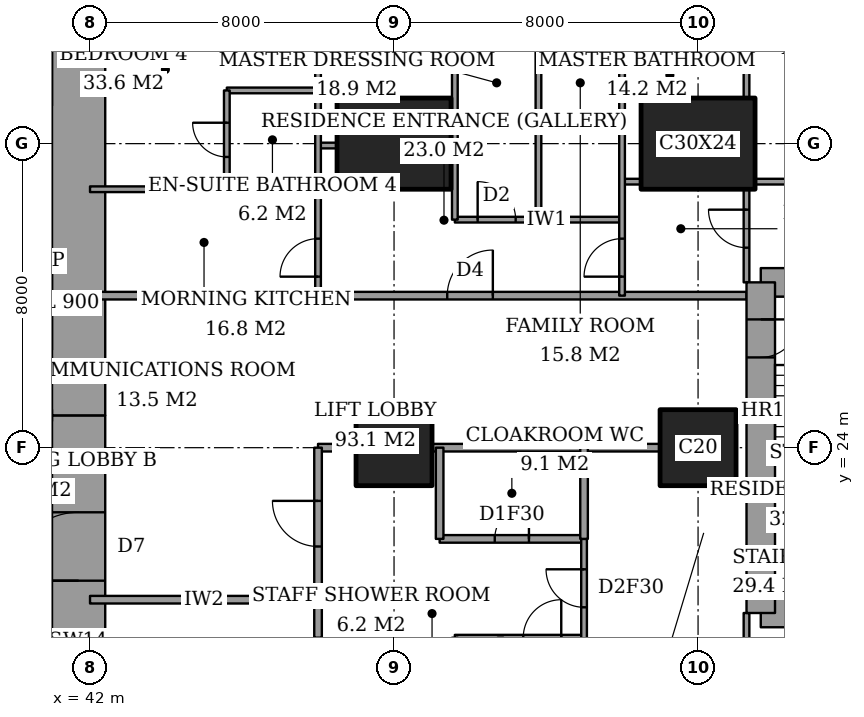
"""IFC4 building model, lengths in metres.
Left out: names, types, materials, properties, quantities, classifications, styles, units other than length and angle.
Written with IfcOpenShell. Run it as: python <this file> out.ifc"""

import sys

from ifc_helpers import new_model, si_unit, direction, frame, frame_2d, origin, origin_2d, place, context, subcontext, project, spatial, rectangle, extrude, element, fill, save


model = new_model("IFC4")
c1 = context("Model", 3, precision=1e-05, world=origin(), true_north=direction((0.0, 1.0)))
c2 = subcontext(c1, "Body", "Model", "MODEL_VIEW")
j1 = project(units=[si_unit("LENGTHUNIT", "METRE"), si_unit("PLANEANGLEUNIT", "RADIAN")], contexts=[c1])
p1 = place(None, origin())
s1 = spatial("IfcSite", under=j1, at=p1, CompositionType="ELEMENT")
p2 = place(p1, origin())
s2 = spatial("IfcBuilding", under=s1, at=p2, CompositionType="ELEMENT")
p3 = place(p2, frame((0.0, 0.0, 143.0)))
s3 = spatial("IfcBuildingStorey", under=s2, at=p3, CompositionType="ELEMENT", Elevation=143.0)
p4 = place(p3, frame((50.0, 24.0, 0.0), z_axis=(0.0, 0.0, 1.0), x_axis=(1.0, 0.0, 0.0)))
e1 = element("IfcColumn", 1, at=p4, inside=s3, PredefinedType="COLUMN", context=c2, shape_type="SweptSolid", body=[
    extrude(rectangle(XDim=2.0, YDim=2.0, at=origin_2d()), origin(), (0.0, 0.0, 1.0), 3.6),
])
p5 = place(p3, frame((50.0, 32.0, 0.0), z_axis=(0.0, 0.0, 1.0), x_axis=(1.0, 0.0, 0.0)))
e2 = element("IfcColumn", 2, at=p5, inside=s3, PredefinedType="COLUMN", context=c2, shape_type="SweptSolid", body=[
    extrude(rectangle(XDim=3.0, YDim=2.4, at=origin_2d()), origin(), (0.0, 0.0, 1.0), 3.6),
])
p6 = place(p3, frame((58.0, 24.0, 0.0), z_axis=(0.0, 0.0, 1.0), x_axis=(1.0, 0.0, 0.0)))
e3 = element("IfcColumn", 3, at=p6, inside=s3, PredefinedType="COLUMN", context=c2, shape_type="SweptSolid", body=[
    extrude(rectangle(XDim=2.0, YDim=2.0, at=origin_2d()), origin(), (0.0, 0.0, 1.0), 3.6),
])
p7 = place(p3, frame((58.0, 32.0, 0.0), z_axis=(0.0, 0.0, 1.0), x_axis=(1.0, 0.0, 0.0)))
e4 = element("IfcColumn", 4, at=p7, inside=s3, PredefinedType="COLUMN", context=c2, shape_type="SweptSolid", body=[
    extrude(rectangle(XDim=3.0, YDim=2.4, at=origin_2d()), origin(), (0.0, 0.0, 1.0), 3.6),
])
p8 = place(p3, frame((41.7, 13.0, 0.0), z_axis=(0.0, 0.0, 1.0), x_axis=(0.0, 1.0, 0.0)))
e5 = element("IfcWall", 5, at=p8, inside=s3, PredefinedType="SHEAR", context=c2, shape_type="SweptSolid", body=[
    extrude(rectangle(XDim=11.85, YDim=1.4, at=frame_2d((5.925, 0.0))), origin(), (0.0, 0.0, 1.0), 3.6),
])
p9 = place(p8, frame((7.5, 0.0, 0.0)))
e6 = element("IfcOpeningElement", 6, at=p9, cuts=e5, PredefinedType="OPENING", context=c2, shape_type="SweptSolid", body=[
    extrude(rectangle(XDim=1.8, YDim=2.4, at=frame_2d((0.9, 1.2))), frame((0.0, 0.71, 0.0), z_axis=(0.0, -1.0, 0.0), x_axis=(1.0, 0.0, 0.0)), (0.0, 0.0, 1.0), 1.42),
])
p10 = place(p3, frame((41.7, 24.85, 0.0), z_axis=(0.0, 0.0, 1.0), x_axis=(0.0, 1.0, 0.0)))
e7 = element("IfcWall", 7, at=p10, inside=s3, PredefinedType="SHEAR", context=c2, shape_type="SweptSolid", body=[
    extrude(rectangle(XDim=10.15, YDim=1.4, at=frame_2d((5.075, 0.0))), origin(), (0.0, 0.0, 1.0), 3.6),
])
for number, where, z_axis, x_axis in (
    (8, (59.65, 19.65, 0.0), (0.0, 0.0, 1.0), (1.0, 0.0, 0.0)),
    (9, (64.1, 28.35, 0.0), (0.0, 0.0, 1.0), (-1.0, 0.0, 0.0)),
):
    element("IfcWall", number, at=place(p3, frame(where, z_axis=z_axis, x_axis=x_axis)), inside=s3, PredefinedType="SHEAR", context=c2, shape_type="SweptSolid", body=[
        extrude(rectangle(XDim=4.45, YDim=0.75, at=frame_2d((2.225, 0.0))), origin(), (0.0, 0.0, 1.0), 3.6),
    ])
p11 = place(p3, frame((59.65, 28.35, 0.0), z_axis=(0.0, 0.0, 1.0), x_axis=(0.0, -1.0, 0.0)))
e10 = element("IfcWall", 10, at=p11, inside=s3, PredefinedType="SHEAR", context=c2, shape_type="SweptSolid", body=[
    extrude(rectangle(XDim=8.7, YDim=0.75, at=frame_2d((4.35, 0.0))), origin(), (0.0, 0.0, 1.0), 3.6),
])
p12 = place(p11, frame((0.975, 0.0, 0.0)))
e11 = element("IfcOpeningElement", 11, at=p12, cuts=e10, PredefinedType="OPENING", context=c2, shape_type="SweptSolid", body=[
    extrude(rectangle(XDim=1.0, YDim=2.1, at=frame_2d((0.5, 1.05))), frame((0.0, 0.385, 0.0), z_axis=(0.0, -1.0, 0.0), x_axis=(1.0, 0.0, 0.0)), (0.0, 0.0, 1.0), 0.77),
])
p13 = place(p3, frame((51.6, 19.0, 0.0), z_axis=(0.0, 0.0, 1.0), x_axis=(1.0, 0.0, 0.0)))
e12 = element("IfcWall", 12, at=p13, inside=s3, PredefinedType="PARTITIONING", context=c2, shape_type="SweptSolid", body=[
    extrude(rectangle(XDim=3.4, YDim=0.15, at=frame_2d((1.7, 0.0))), origin(), (0.0, 0.0, 1.0), 3.35),
])
p14 = place(p13, frame((1.8, 0.0, 0.0)))
e13 = element("IfcOpeningElement", 13, at=p14, cuts=e12, PredefinedType="OPENING", context=c2, shape_type="SweptSolid", body=[
    extrude(rectangle(XDim=1.0, YDim=2.1, at=frame_2d((0.5, 1.05))), frame((0.0, 0.085, 0.0), z_axis=(0.0, -1.0, 0.0), x_axis=(1.0, 0.0, 0.0)), (0.0, 0.0, 1.0), 0.17),
])
p15 = place(p3, frame((42.0, 20.0, 0.0), z_axis=(0.0, 0.0, 1.0), x_axis=(1.0, 0.0, 0.0)))
e14 = element("IfcWall", 14, at=p15, inside=s3, PredefinedType="PARTITIONING", context=c2, shape_type="SweptSolid", body=[
    extrude(rectangle(XDim=6.0, YDim=0.2, at=frame_2d((3.0, 0.0))), origin(), (0.0, 0.0, 1.0), 3.35),
])
p16 = place(p3, frame((51.2, 21.6, 0.0), z_axis=(0.0, 0.0, 1.0), x_axis=(1.0, 0.0, 0.0)))
e15 = element("IfcWall", 15, at=p16, inside=s3, PredefinedType="PARTITIONING", context=c2, shape_type="SweptSolid", body=[
    extrude(rectangle(XDim=3.8, YDim=0.2, at=frame_2d((1.9, 0.0))), origin(), (0.0, 0.0, 1.0), 3.35),
])
p17 = place(p16, frame((1.45, 0.0, 0.0)))
e16 = element("IfcOpeningElement", 16, at=p17, cuts=e15, PredefinedType="OPENING", context=c2, shape_type="SweptSolid", body=[
    extrude(rectangle(XDim=0.9, YDim=2.1, at=frame_2d((0.45, 1.05))), frame((0.0, 0.11, 0.0), z_axis=(0.0, -1.0, 0.0), x_axis=(1.0, 0.0, 0.0)), (0.0, 0.0, 1.0), 0.22),
])
p18 = place(p3, frame((48.0, 24.0, 0.0), z_axis=(0.0, 0.0, 1.0), x_axis=(1.0, 0.0, 0.0)))
e17 = element("IfcWall", 17, at=p18, inside=s3, PredefinedType="PARTITIONING", context=c2, shape_type="SweptSolid", body=[
    extrude(rectangle(XDim=1.0, YDim=0.2, at=frame_2d((0.5, 0.0))), origin(), (0.0, 0.0, 1.0), 3.35),
])
p19 = place(p3, frame((51.0, 24.0, 0.0), z_axis=(0.0, 0.0, 1.0), x_axis=(1.0, 0.0, 0.0)))
e18 = element("IfcWall", 18, at=p19, inside=s3, PredefinedType="PARTITIONING", context=c2, shape_type="SweptSolid", body=[
    extrude(rectangle(XDim=6.0, YDim=0.2, at=frame_2d((3.0, 0.0))), origin(), (0.0, 0.0, 1.0), 3.35),
])
p20 = place(p3, frame((42.0, 28.0, 0.0), z_axis=(0.0, 0.0, 1.0), x_axis=(1.0, 0.0, 0.0)))
e19 = element("IfcWall", 19, at=p20, inside=s3, PredefinedType="PARTITIONING", context=c2, shape_type="SweptSolid", body=[
    extrude(rectangle(XDim=17.275, YDim=0.2, at=frame_2d((8.637, 0.0))), origin(), (0.0, 0.0, 1.0), 3.35),
])
p21 = place(p20, frame((9.4, 0.0, 0.0)))
e20 = element("IfcOpeningElement", 20, at=p21, cuts=e19, PredefinedType="OPENING", context=c2, shape_type="SweptSolid", body=[
    extrude(rectangle(XDim=1.2, YDim=2.4, at=frame_2d((0.6, 1.2))), frame((0.0, 0.11, 0.0), z_axis=(0.0, -1.0, 0.0), x_axis=(1.0, 0.0, 0.0)), (0.0, 0.0, 1.0), 0.22),
])
p22 = place(p3, frame((51.6, 30.0, 0.0), z_axis=(0.0, 0.0, 1.0), x_axis=(1.0, 0.0, 0.0)))
e21 = element("IfcWall", 21, at=p22, inside=s3, PredefinedType="PARTITIONING", context=c2, shape_type="SweptSolid", body=[
    extrude(rectangle(XDim=4.4, YDim=0.15, at=frame_2d((2.2, 0.0))), origin(), (0.0, 0.0, 1.0), 3.35),
])
p23 = place(p22, frame((0.6, 0.0, 0.0)))
e22 = element("IfcOpeningElement", 22, at=p23, cuts=e21, PredefinedType="OPENING", context=c2, shape_type="SweptSolid", body=[
    extrude(rectangle(XDim=1.0, YDim=2.1, at=frame_2d((0.5, 1.05))), frame((0.0, 0.085, 0.0), z_axis=(0.0, -1.0, 0.0), x_axis=(1.0, 0.0, 0.0)), (0.0, 0.0, 1.0), 0.17),
])
p24 = place(p3, frame((42.0, 30.8, 0.0), z_axis=(0.0, 0.0, 1.0), x_axis=(1.0, 0.0, 0.0)))
e23 = element("IfcWall", 23, at=p24, inside=s3, PredefinedType="PARTITIONING", context=c2, shape_type="SweptSolid", body=[
    extrude(rectangle(XDim=6.0, YDim=0.15, at=frame_2d((3.0, 0.0))), origin(), (0.0, 0.0, 1.0), 3.35),
])
p25 = place(p3, frame((56.0, 31.0, 0.0), z_axis=(0.0, 0.0, 1.0), x_axis=(1.0, 0.0, 0.0)))
e24 = element("IfcWall", 24, at=p25, inside=s3, PredefinedType="PARTITIONING", context=c2, shape_type="SweptSolid", body=[
    extrude(rectangle(XDim=0.5, YDim=0.15, at=frame_2d((0.25, 0.0))), origin(), (0.0, 0.0, 1.0), 3.35),
])
p26 = place(p3, frame((59.5, 31.0, 0.0), z_axis=(0.0, 0.0, 1.0), x_axis=(1.0, 0.0, 0.0)))
e25 = element("IfcWall", 25, at=p26, inside=s3, PredefinedType="PARTITIONING", context=c2, shape_type="SweptSolid", body=[
    extrude(rectangle(XDim=5.15, YDim=0.15, at=frame_2d((2.575, 0.0))), origin(), (0.0, 0.0, 1.0), 3.35),
])
p27 = place(p3, frame((48.0, 31.95, 0.0), z_axis=(0.0, 0.0, 1.0), x_axis=(1.0, 0.0, 0.0)))
e26 = element("IfcWall", 26, at=p27, inside=s3, PredefinedType="PARTITIONING", context=c2, shape_type="SweptSolid", body=[
    extrude(rectangle(XDim=0.5, YDim=0.15, at=frame_2d((0.25, 0.0))), origin(), (0.0, 0.0, 1.0), 2.634),
])
p28 = place(p3, frame((45.6, 33.4, 0.0), z_axis=(0.0, 0.0, 1.0), x_axis=(1.0, 0.0, 0.0)))
e27 = element("IfcWall", 27, at=p28, inside=s3, PredefinedType="PARTITIONING", context=c2, shape_type="SweptSolid", body=[
    extrude(rectangle(XDim=2.4, YDim=0.15, at=frame_2d((1.2, 0.0))), origin(), (0.0, 0.0, 1.0), 3.35),
])
p29 = place(p3, frame((45.6, 30.8, 0.0), z_axis=(0.0, 0.0, 1.0), x_axis=(0.0, 1.0, 0.0)))
e28 = element("IfcWall", 28, at=p29, inside=s3, PredefinedType="PARTITIONING", context=c2, shape_type="SweptSolid", body=[
    extrude(rectangle(XDim=2.6, YDim=0.15, at=frame_2d((1.3, 0.0))), origin(), (0.0, 0.0, 1.0), 3.35),
])
p30 = place(p29, frame((0.85, 0.0, 0.0)))
e29 = element("IfcOpeningElement", 29, at=p30, cuts=e28, PredefinedType="OPENING", context=c2, shape_type="SweptSolid", body=[
    extrude(rectangle(XDim=0.9, YDim=2.1, at=frame_2d((0.45, 1.05))), frame((0.0, 0.085, 0.0), z_axis=(0.0, -1.0, 0.0), x_axis=(1.0, 0.0, 0.0)), (0.0, 0.0, 1.0), 0.17),
])
p31 = place(p3, frame((48.0, 19.0, 0.0), z_axis=(0.0, 0.0, 1.0), x_axis=(0.0, 1.0, 0.0)))
e30 = element("IfcWall", 30, at=p31, inside=s3, PredefinedType="PARTITIONING", context=c2, shape_type="SweptSolid", body=[
    extrude(rectangle(XDim=5.0, YDim=0.2, at=frame_2d((2.5, 0.0))), origin(), (0.0, 0.0, 1.0), 3.35),
])
p32 = place(p31, frame((2.4, 0.0, 0.0)))
e31 = element("IfcOpeningElement", 31, at=p32, cuts=e30, PredefinedType="OPENING", context=c2, shape_type="SweptSolid", body=[
    extrude(rectangle(XDim=1.2, YDim=2.4, at=frame_2d((0.6, 1.2))), frame((0.0, 0.11, 0.0), z_axis=(0.0, -1.0, 0.0), x_axis=(1.0, 0.0, 0.0)), (0.0, 0.0, 1.0), 0.22),
])
p33 = place(p3, frame((48.0, 28.0, 0.0), z_axis=(0.0, 0.0, 1.0), x_axis=(0.0, 1.0, 0.0)))
e32 = element("IfcWall", 32, at=p33, inside=s3, PredefinedType="PARTITIONING", context=c2, shape_type="SweptSolid", body=[
    extrude(rectangle(XDim=9.2, YDim=0.15, at=frame_2d((4.6, 0.0))), origin(), (0.0, 0.0, 1.0), 3.35),
])
p34 = place(p33, frame((0.5, 0.0, 0.0)))
e33 = element("IfcOpeningElement", 33, at=p34, cuts=e32, PredefinedType="OPENING", context=c2, shape_type="SweptSolid", body=[
    extrude(rectangle(XDim=1.0, YDim=2.1, at=frame_2d((0.5, 1.05))), frame((0.0, 0.085, 0.0), z_axis=(0.0, -1.0, 0.0), x_axis=(1.0, 0.0, 0.0)), (0.0, 0.0, 1.0), 0.17),
])
p35 = place(p3, frame((51.2, 21.6, 0.0), z_axis=(0.0, 0.0, 1.0), x_axis=(0.0, 1.0, 0.0)))
e34 = element("IfcWall", 34, at=p35, inside=s3, PredefinedType="PARTITIONING", context=c2, shape_type="SweptSolid", body=[
    extrude(rectangle(XDim=2.4, YDim=0.2, at=frame_2d((1.2, 0.0))), origin(), (0.0, 0.0, 1.0), 3.35),
])
p36 = place(p3, frame((51.6, 16.05, 0.0), z_axis=(0.0, 0.0, 1.0), x_axis=(0.0, 1.0, 0.0)))
e35 = element("IfcWall", 35, at=p36, inside=s3, PredefinedType="PARTITIONING", context=c2, shape_type="SweptSolid", body=[
    extrude(rectangle(XDim=2.95, YDim=0.15, at=frame_2d((1.475, 0.0))), origin(), (0.0, 0.0, 1.0), 3.35),
])
for number, where, z_axis, x_axis in (
    (36, (51.6, 30.0, 0.0), (0.0, 0.0, 1.0), (0.0, 1.0, 0.0)),
    (37, (53.8, 30.0, 0.0), (0.0, 0.0, 1.0), (0.0, 1.0, 0.0)),
):
    element("IfcWall", number, at=place(p3, frame(where, z_axis=z_axis, x_axis=x_axis)), inside=s3, PredefinedType="PARTITIONING", context=c2, shape_type="SweptSolid", body=[
        extrude(rectangle(XDim=7.2, YDim=0.15, at=frame_2d((3.6, 0.0))), origin(), (0.0, 0.0, 1.0), 3.35),
    ])
p37 = place(p3, frame((55.0, 21.6, 0.0), z_axis=(0.0, 0.0, 1.0), x_axis=(0.0, 1.0, 0.0)))
e38 = element("IfcWall", 38, at=p37, inside=s3, PredefinedType="PARTITIONING", context=c2, shape_type="SweptSolid", body=[
    extrude(rectangle(XDim=2.4, YDim=0.2, at=frame_2d((1.2, 0.0))), origin(), (0.0, 0.0, 1.0), 3.35),
])
p38 = place(p3, frame((55.0, 10.6, 0.0), z_axis=(0.0, 0.0, 1.0), x_axis=(0.0, 1.0, 0.0)))
e39 = element("IfcWall", 39, at=p38, inside=s3, PredefinedType="PARTITIONING", context=c2, shape_type="SweptSolid", body=[
    extrude(rectangle(XDim=11.0, YDim=0.15, at=frame_2d((5.5, 0.0))), origin(), (0.0, 0.0, 1.0), 3.35),
])
p39 = place(p38, frame((9.2, 0.0, 0.0)))
e40 = element("IfcOpeningElement", 40, at=p39, cuts=e39, PredefinedType="OPENING", context=c2, shape_type="SweptSolid", body=[
    extrude(rectangle(XDim=1.0, YDim=2.1, at=frame_2d((0.5, 1.05))), frame((0.0, 0.085, 0.0), z_axis=(0.0, -1.0, 0.0), x_axis=(1.0, 0.0, 0.0)), (0.0, 0.0, 1.0), 0.17),
])
p40 = place(p3, frame((56.0, 28.0, 0.0), z_axis=(0.0, 0.0, 1.0), x_axis=(0.0, 1.0, 0.0)))
e41 = element("IfcWall", 41, at=p40, inside=s3, PredefinedType="PARTITIONING", context=c2, shape_type="SweptSolid", body=[
    extrude(rectangle(XDim=9.2, YDim=0.15, at=frame_2d((4.6, 0.0))), origin(), (0.0, 0.0, 1.0), 3.35),
])
p41 = place(p40, frame((0.5, 0.0, 0.0)))
e42 = element("IfcOpeningElement", 42, at=p41, cuts=e41, PredefinedType="OPENING", context=c2, shape_type="SweptSolid", body=[
    extrude(rectangle(XDim=1.0, YDim=2.1, at=frame_2d((0.5, 1.05))), frame((0.0, 0.085, 0.0), z_axis=(0.0, -1.0, 0.0), x_axis=(1.0, 0.0, 0.0)), (0.0, 0.0, 1.0), 0.17),
])
p42 = place(p3, frame((59.275, 17.2, 0.0), z_axis=(0.0, 0.0, 1.0), x_axis=(0.0, 1.0, 0.0)))
e43 = element("IfcWall", 43, at=p42, inside=s3, PredefinedType="PARTITIONING", context=c2, shape_type="SweptSolid", body=[
    extrude(rectangle(XDim=2.45, YDim=0.15, at=frame_2d((1.225, 0.0))), origin(), (0.0, 0.0, 1.0), 3.35),
])
p43 = place(p42, frame((0.538, 0.0, 0.0)))
e44 = element("IfcOpeningElement", 44, at=p43, cuts=e43, PredefinedType="OPENING", context=c2, shape_type="SweptSolid", body=[
    extrude(rectangle(XDim=1.0, YDim=2.1, at=frame_2d((0.5, 1.05))), frame((0.0, 0.085, 0.0), z_axis=(0.0, -1.0, 0.0), x_axis=(1.0, 0.0, 0.0)), (0.0, 0.0, 1.0), 0.17),
])
p44 = place(p3, frame((59.275, 28.35, 0.0), z_axis=(0.0, 0.0, 1.0), x_axis=(0.0, 1.0, 0.0)))
e45 = element("IfcWall", 45, at=p44, inside=s3, PredefinedType="PARTITIONING", context=c2, shape_type="SweptSolid", body=[
    extrude(rectangle(XDim=2.45, YDim=0.15, at=frame_2d((1.225, 0.0))), origin(), (0.0, 0.0, 1.0), 3.35),
])
p45 = place(p44, frame((0.913, 0.0, 0.0)))
e46 = element("IfcOpeningElement", 46, at=p45, cuts=e45, PredefinedType="OPENING", context=c2, shape_type="SweptSolid", body=[
    extrude(rectangle(XDim=1.0, YDim=2.1, at=frame_2d((0.5, 1.05))), frame((0.0, 0.085, 0.0), z_axis=(0.0, -1.0, 0.0), x_axis=(1.0, 0.0, 0.0)), (0.0, 0.0, 1.0), 0.17),
])
p46 = place(p3, frame((59.275, 33.2, 0.0), z_axis=(0.0, 0.0, 1.0), x_axis=(0.0, 1.0, 0.0)))
e47 = element("IfcWall", 47, at=p46, inside=s3, PredefinedType="PARTITIONING", context=c2, shape_type="SweptSolid", body=[
    extrude(rectangle(XDim=4.0, YDim=0.15, at=frame_2d((2.0, 0.0))), origin(), (0.0, 0.0, 1.0), 3.35),
])
p47 = place(p39, origin())
e48 = element("IfcDoor", 48, at=p47, inside=s3, OperationType="SINGLE_SWING_LEFT", PredefinedType="DOOR", context=c2, shape_type="SweptSolid", body=[
    extrude(rectangle(XDim=1.0, YDim=2.1, at=frame_2d((0.5, 1.05))), frame((0.0, 0.025, 0.0), z_axis=(0.0, -1.0, 0.0), x_axis=(1.0, 0.0, 0.0)), (0.0, 0.0, 1.0), 0.05),
])
fill(e40, e48)
p48 = place(p17, origin())
e49 = element("IfcDoor", 49, at=p48, inside=s3, OperationType="SINGLE_SWING_LEFT", PredefinedType="DOOR", context=c2, shape_type="SweptSolid", body=[
    extrude(rectangle(XDim=0.9, YDim=2.1, at=frame_2d((0.45, 1.05))), frame((0.0, 0.025, 0.0), z_axis=(0.0, -1.0, 0.0), x_axis=(1.0, 0.0, 0.0)), (0.0, 0.0, 1.0), 0.05),
])
fill(e16, e49)
p49 = place(p32, origin())
e50 = element("IfcDoor", 50, at=p49, inside=s3, OperationType="SINGLE_SWING_LEFT", PredefinedType="DOOR", context=c2, shape_type="SweptSolid", body=[
    extrude(rectangle(XDim=1.2, YDim=2.4, at=frame_2d((0.6, 1.2))), frame((0.0, 0.025, 0.0), z_axis=(0.0, -1.0, 0.0), x_axis=(1.0, 0.0, 0.0)), (0.0, 0.0, 1.0), 0.05),
])
fill(e31, e50)
p50 = place(p14, origin())
e51 = element("IfcDoor", 51, at=p50, inside=s3, OperationType="SINGLE_SWING_LEFT", PredefinedType="DOOR", context=c2, shape_type="SweptSolid", body=[
    extrude(rectangle(XDim=1.0, YDim=2.1, at=frame_2d((0.5, 1.05))), frame((0.0, 0.025, 0.0), z_axis=(0.0, -1.0, 0.0), x_axis=(1.0, 0.0, 0.0)), (0.0, 0.0, 1.0), 0.05),
])
fill(e13, e51)
p51 = place(p45, origin())
e52 = element("IfcDoor", 52, at=p51, inside=s3, OperationType="SINGLE_SWING_LEFT", PredefinedType="DOOR", context=c2, shape_type="SweptSolid", body=[
    extrude(rectangle(XDim=1.0, YDim=2.1, at=frame_2d((0.5, 1.05))), frame((0.0, 0.025, 0.0), z_axis=(0.0, -1.0, 0.0), x_axis=(1.0, 0.0, 0.0)), (0.0, 0.0, 1.0), 0.05),
])
fill(e46, e52)
p52 = place(p41, origin())
e53 = element("IfcDoor", 53, at=p52, inside=s3, OperationType="SINGLE_SWING_RIGHT", PredefinedType="DOOR", context=c2, shape_type="SweptSolid", body=[
    extrude(rectangle(XDim=1.0, YDim=2.1, at=frame_2d((0.5, 1.05))), frame((0.0, 0.025, 0.0), z_axis=(0.0, -1.0, 0.0), x_axis=(1.0, 0.0, 0.0)), (0.0, 0.0, 1.0), 0.05),
])
fill(e42, e53)
p53 = place(p21, origin())
e54 = element("IfcDoor", 54, at=p53, inside=s3, OperationType="SINGLE_SWING_LEFT", PredefinedType="DOOR", context=c2, shape_type="SweptSolid", body=[
    extrude(rectangle(XDim=1.2, YDim=2.4, at=frame_2d((0.6, 1.2))), frame((0.0, 0.025, 0.0), z_axis=(0.0, -1.0, 0.0), x_axis=(1.0, 0.0, 0.0)), (0.0, 0.0, 1.0), 0.05),
])
fill(e20, e54)
p54 = place(p23, origin())
e55 = element("IfcDoor", 55, at=p54, inside=s3, OperationType="SINGLE_SWING_RIGHT", PredefinedType="DOOR", context=c2, shape_type="SweptSolid", body=[
    extrude(rectangle(XDim=1.0, YDim=2.1, at=frame_2d((0.5, 1.05))), frame((0.0, 0.025, 0.0), z_axis=(0.0, -1.0, 0.0), x_axis=(1.0, 0.0, 0.0)), (0.0, 0.0, 1.0), 0.05),
])
fill(e22, e55)
p55 = place(p30, origin())
e56 = element("IfcDoor", 56, at=p55, inside=s3, OperationType="SINGLE_SWING_LEFT", PredefinedType="DOOR", context=c2, shape_type="SweptSolid", body=[
    extrude(rectangle(XDim=0.9, YDim=2.1, at=frame_2d((0.45, 1.05))), frame((0.0, 0.025, 0.0), z_axis=(0.0, -1.0, 0.0), x_axis=(1.0, 0.0, 0.0)), (0.0, 0.0, 1.0), 0.05),
])
fill(e29, e56)
p56 = place(p34, origin())
e57 = element("IfcDoor", 57, at=p56, inside=s3, OperationType="SINGLE_SWING_RIGHT", PredefinedType="DOOR", context=c2, shape_type="SweptSolid", body=[
    extrude(rectangle(XDim=1.0, YDim=2.1, at=frame_2d((0.5, 1.05))), frame((0.0, 0.025, 0.0), z_axis=(0.0, -1.0, 0.0), x_axis=(1.0, 0.0, 0.0)), (0.0, 0.0, 1.0), 0.05),
])
fill(e33, e57)
p57 = place(p9, origin())
e58 = element("IfcDoor", 58, at=p57, inside=s3, OperationType="DOUBLE_DOOR_DOUBLE_SWING", PredefinedType="DOOR", context=c2, shape_type="SweptSolid", body=[
    extrude(rectangle(XDim=1.8, YDim=2.4, at=frame_2d((0.9, 1.2))), frame((0.0, 0.025, 0.0), z_axis=(0.0, -1.0, 0.0), x_axis=(1.0, 0.0, 0.0)), (0.0, 0.0, 1.0), 0.05),
])
fill(e6, e58)
p58 = place(p12, origin())
e59 = element("IfcDoor", 59, at=p58, inside=s3, OperationType="SINGLE_SWING_RIGHT", PredefinedType="DOOR", context=c2, shape_type="SweptSolid", body=[
    extrude(rectangle(XDim=1.0, YDim=2.1, at=frame_2d((0.5, 1.05))), frame((0.0, 0.025, 0.0), z_axis=(0.0, -1.0, 0.0), x_axis=(1.0, 0.0, 0.0)), (0.0, 0.0, 1.0), 0.05),
])
fill(e11, e59)
save(model, sys.argv[1])
